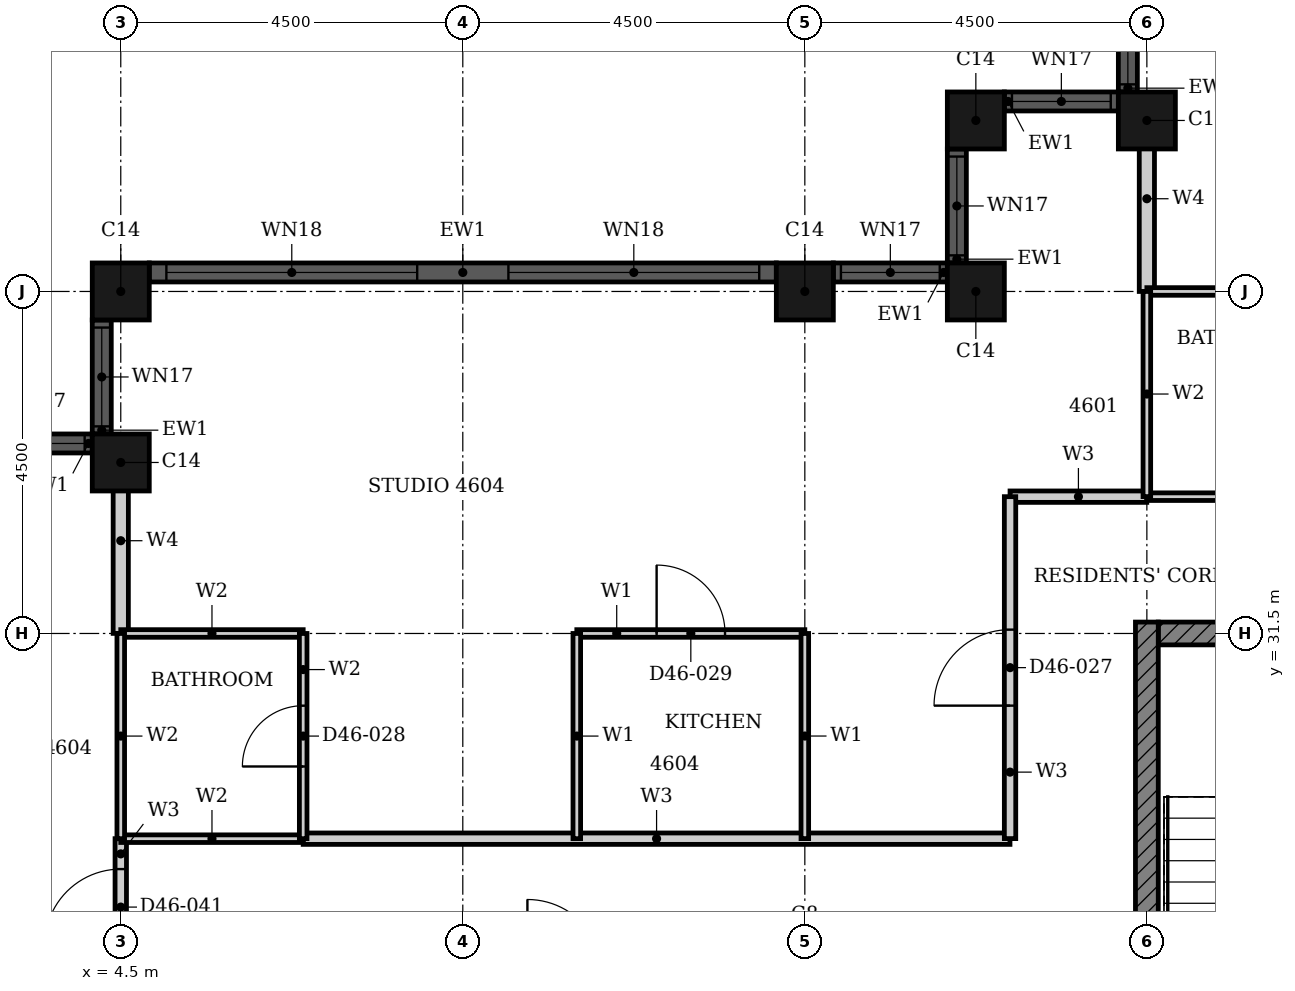
"""IFC4 building model, lengths in metres.
Left out: names, types, materials, properties, quantities, classifications, styles, units other than length and angle.
Written with IfcOpenShell. Run it as: python <this file> out.ifc"""

import sys

from ifc_helpers import new_model, si_unit, direction, frame, frame_2d, origin, origin_2d, place, context, subcontext, project, spatial, rectangle, hollow_rectangle, extrude, element, fill, save


model = new_model("IFC4")
c1 = context("Model", 3, precision=1e-05, world=origin(), true_north=direction((0.0, 1.0)))
c2 = subcontext(c1, "Body", "Model", "MODEL_VIEW")
j1 = project(units=[si_unit("LENGTHUNIT", "METRE"), si_unit("PLANEANGLEUNIT", "RADIAN")], contexts=[c1])
p1 = place(None, origin())
s1 = spatial("IfcSite", under=j1, at=p1, CompositionType="ELEMENT")
p2 = place(p1, origin())
s2 = spatial("IfcBuilding", under=s1, at=p2, CompositionType="ELEMENT")
p3 = place(p2, frame((0.0, 0.0, 183.9)))
s3 = spatial("IfcBuildingStorey", under=s2, at=p3, CompositionType="ELEMENT", Elevation=183.9)
for number, where, z_axis, x_axis in (
    (1, (18.0, 38.25, 0.0), (0.0, 0.0, 1.0), (1.0, 0.0, 0.0)),
    (2, (15.75, 38.25, 0.0), (0.0, 0.0, 1.0), (1.0, 0.0, 0.0)),
    (3, (15.75, 36.0, 0.0), (0.0, 0.0, 1.0), (1.0, 0.0, 0.0)),
    (4, (13.5, 36.0, 0.0), (0.0, 0.0, 1.0), (1.0, 0.0, 0.0)),
    (5, (4.5, 36.0, 0.0), (0.0, 0.0, 1.0), (1.0, 0.0, 0.0)),
    (6, (4.5, 33.75, 0.0), (0.0, 0.0, 1.0), (1.0, 0.0, 0.0)),
):
    element("IfcColumn", number, at=place(p3, frame(where, z_axis=z_axis, x_axis=x_axis)), inside=s3, PredefinedType="COLUMN", context=c2, shape_type="SweptSolid", body=[
        extrude(hollow_rectangle(XDim=0.75, YDim=0.75, WallThickness=0.024, at=origin_2d()), origin(), (0.0, 0.0, 1.0), 3.7),
    ])
p4 = place(p3, frame((17.75, 40.125, 0.0), z_axis=(0.0, 0.0, 1.0), x_axis=(0.0, -1.0, 0.0)))
e7 = element("IfcWall", 7, at=p4, inside=s3, PredefinedType="SOLIDWALL", context=c2, shape_type="SweptSolid", body=[
    extrude(rectangle(XDim=1.5, YDim=0.25, at=frame_2d((0.75, 0.0))), origin(), (0.0, 0.0, 1.0), 3.7),
])
p5 = place(p4, frame((0.1, 0.0, 0.9)))
e8 = element("IfcOpeningElement", 8, at=p5, cuts=e7, PredefinedType="OPENING", context=c2, shape_type="SweptSolid", body=[
    extrude(rectangle(XDim=1.3, YDim=1.95, at=frame_2d((0.65, 0.975))), frame((0.0, 0.135, 0.0), z_axis=(0.0, -1.0, 0.0), x_axis=(1.0, 0.0, 0.0)), (0.0, 0.0, 1.0), 0.27),
])
p6 = place(p3, frame((17.625, 38.5, 0.0), z_axis=(0.0, 0.0, 1.0), x_axis=(-1.0, 0.0, 0.0)))
e9 = element("IfcWall", 9, at=p6, inside=s3, PredefinedType="SOLIDWALL", context=c2, shape_type="SweptSolid", body=[
    extrude(rectangle(XDim=1.5, YDim=0.25, at=frame_2d((0.75, 0.0))), origin(), (0.0, 0.0, 1.0), 3.7),
])
p7 = place(p6, frame((0.1, 0.0, 0.9)))
e10 = element("IfcOpeningElement", 10, at=p7, cuts=e9, PredefinedType="OPENING", context=c2, shape_type="SweptSolid", body=[
    extrude(rectangle(XDim=1.3, YDim=1.95, at=frame_2d((0.65, 0.975))), frame((0.0, 0.135, 0.0), z_axis=(0.0, -1.0, 0.0), x_axis=(1.0, 0.0, 0.0)), (0.0, 0.0, 1.0), 0.27),
])
p8 = place(p3, frame((15.5, 37.875, 0.0), z_axis=(0.0, 0.0, 1.0), x_axis=(0.0, -1.0, 0.0)))
e11 = element("IfcWall", 11, at=p8, inside=s3, PredefinedType="SOLIDWALL", context=c2, shape_type="SweptSolid", body=[
    extrude(rectangle(XDim=1.5, YDim=0.25, at=frame_2d((0.75, 0.0))), origin(), (0.0, 0.0, 1.0), 3.7),
])
p9 = place(p8, frame((0.1, 0.0, 0.9)))
e12 = element("IfcOpeningElement", 12, at=p9, cuts=e11, PredefinedType="OPENING", context=c2, shape_type="SweptSolid", body=[
    extrude(rectangle(XDim=1.3, YDim=1.95, at=frame_2d((0.65, 0.975))), frame((0.0, 0.135, 0.0), z_axis=(0.0, -1.0, 0.0), x_axis=(1.0, 0.0, 0.0)), (0.0, 0.0, 1.0), 0.27),
])
p10 = place(p3, frame((15.375, 36.25, 0.0), z_axis=(0.0, 0.0, 1.0), x_axis=(-1.0, 0.0, 0.0)))
e13 = element("IfcWall", 13, at=p10, inside=s3, PredefinedType="SOLIDWALL", context=c2, shape_type="SweptSolid", body=[
    extrude(rectangle(XDim=1.5, YDim=0.25, at=frame_2d((0.75, 0.0))), origin(), (0.0, 0.0, 1.0), 3.7),
])
p11 = place(p10, frame((0.1, 0.0, 0.9)))
e14 = element("IfcOpeningElement", 14, at=p11, cuts=e13, PredefinedType="OPENING", context=c2, shape_type="SweptSolid", body=[
    extrude(rectangle(XDim=1.3, YDim=1.95, at=frame_2d((0.65, 0.975))), frame((0.0, 0.135, 0.0), z_axis=(0.0, -1.0, 0.0), x_axis=(1.0, 0.0, 0.0)), (0.0, 0.0, 1.0), 0.27),
])
p12 = place(p3, frame((13.125, 36.25, 0.0), z_axis=(0.0, 0.0, 1.0), x_axis=(-1.0, 0.0, 0.0)))
e15 = element("IfcWall", 15, at=p12, inside=s3, PredefinedType="SOLIDWALL", context=c2, shape_type="SweptSolid", body=[
    extrude(rectangle(XDim=8.25, YDim=0.25, at=frame_2d((4.125, 0.0))), origin(), (0.0, 0.0, 1.0), 3.7),
])
p13 = place(p12, frame((0.225, 0.0, 0.45)))
e16 = element("IfcOpeningElement", 16, at=p13, cuts=e15, PredefinedType="OPENING", context=c2, shape_type="SweptSolid", body=[
    extrude(rectangle(XDim=3.3, YDim=2.4, at=frame_2d((1.65, 1.2))), frame((0.0, 0.135, 0.0), z_axis=(0.0, -1.0, 0.0), x_axis=(1.0, 0.0, 0.0)), (0.0, 0.0, 1.0), 0.27),
])
p14 = place(p12, frame((4.725, 0.0, 0.45)))
e17 = element("IfcOpeningElement", 17, at=p14, cuts=e15, PredefinedType="OPENING", context=c2, shape_type="SweptSolid", body=[
    extrude(rectangle(XDim=3.3, YDim=2.4, at=frame_2d((1.65, 1.2))), frame((0.0, 0.135, 0.0), z_axis=(0.0, -1.0, 0.0), x_axis=(1.0, 0.0, 0.0)), (0.0, 0.0, 1.0), 0.27),
])
p15 = place(p3, frame((4.25, 35.625, 0.0), z_axis=(0.0, 0.0, 1.0), x_axis=(0.0, -1.0, 0.0)))
e18 = element("IfcWall", 18, at=p15, inside=s3, PredefinedType="SOLIDWALL", context=c2, shape_type="SweptSolid", body=[
    extrude(rectangle(XDim=1.5, YDim=0.25, at=frame_2d((0.75, 0.0))), origin(), (0.0, 0.0, 1.0), 3.7),
])
p16 = place(p15, frame((0.1, 0.0, 0.9)))
e19 = element("IfcOpeningElement", 19, at=p16, cuts=e18, PredefinedType="OPENING", context=c2, shape_type="SweptSolid", body=[
    extrude(rectangle(XDim=1.3, YDim=1.95, at=frame_2d((0.65, 0.975))), frame((0.0, 0.135, 0.0), z_axis=(0.0, -1.0, 0.0), x_axis=(1.0, 0.0, 0.0)), (0.0, 0.0, 1.0), 0.27),
])
p17 = place(p3, frame((4.125, 34.0, 0.0), z_axis=(0.0, 0.0, 1.0), x_axis=(-1.0, 0.0, 0.0)))
e20 = element("IfcWall", 20, at=p17, inside=s3, PredefinedType="SOLIDWALL", context=c2, shape_type="SweptSolid", body=[
    extrude(rectangle(XDim=1.5, YDim=0.25, at=frame_2d((0.75, 0.0))), origin(), (0.0, 0.0, 1.0), 3.7),
])
p18 = place(p17, frame((0.1, 0.0, 0.9)))
e21 = element("IfcOpeningElement", 21, at=p18, cuts=e20, PredefinedType="OPENING", context=c2, shape_type="SweptSolid", body=[
    extrude(rectangle(XDim=1.3, YDim=1.95, at=frame_2d((0.65, 0.975))), frame((0.0, 0.135, 0.0), z_axis=(0.0, -1.0, 0.0), x_axis=(1.0, 0.0, 0.0)), (0.0, 0.0, 1.0), 0.27),
])
p19 = place(p3, frame((18.15, 31.5, 0.0), z_axis=(0.0, 0.0, 1.0), x_axis=(1.0, 0.0, 0.0)))
e22 = element("IfcWall", 22, at=p19, inside=s3, PredefinedType="SHEAR", context=c2, shape_type="SweptSolid", body=[
    extrude(rectangle(XDim=9.368, YDim=0.3, at=frame_2d((4.684, 0.0))), origin(), (0.0, 0.0, 1.0), 3.3),
])
p20 = place(p19, frame((4.736, 0.0, 0.0)))
e23 = element("IfcOpeningElement", 23, at=p20, cuts=e22, PredefinedType="OPENING", context=c2, shape_type="SweptSolid", body=[
    extrude(rectangle(XDim=1.8, YDim=2.1, at=frame_2d((0.9, 1.05))), frame((0.0, 0.16, 0.0), z_axis=(0.0, -1.0, 0.0), x_axis=(1.0, 0.0, 0.0)), (0.0, 0.0, 1.0), 0.32),
])
p21 = place(p3, frame((18.0, 22.35, 0.0), z_axis=(0.0, 0.0, 1.0), x_axis=(0.0, 1.0, 0.0)))
e24 = element("IfcWall", 24, at=p21, inside=s3, PredefinedType="SHEAR", context=c2, shape_type="SweptSolid", body=[
    extrude(rectangle(XDim=9.3, YDim=0.3, at=frame_2d((4.65, 0.0))), origin(), (0.0, 0.0, 1.0), 3.3),
])
p22 = place(p3, frame((6.9, 28.8, 0.0), z_axis=(0.0, 0.0, 1.0), x_axis=(1.0, 0.0, 0.0)))
e25 = element("IfcWall", 25, at=p22, inside=s3, PredefinedType="PARTITIONING", context=c2, shape_type="SweptSolid", body=[
    extrude(rectangle(XDim=9.299, YDim=0.15, at=frame_2d((4.649, 0.0))), origin(), (0.0, 0.0, 1.0), 3.3),
])
p23 = place(p3, frame((16.2, 33.3, 0.0), z_axis=(0.0, 0.0, 1.0), x_axis=(1.0, 0.0, 0.0)))
e26 = element("IfcWall", 26, at=p23, inside=s3, PredefinedType="PARTITIONING", context=c2, shape_type="SweptSolid", body=[
    extrude(rectangle(XDim=1.799, YDim=0.15, at=frame_2d((0.899, 0.0))), origin(), (0.0, 0.0, 1.0), 3.3),
])
p24 = place(p3, frame((16.2, 28.801, 0.0), z_axis=(0.0, 0.0, 1.0), x_axis=(0.0, 1.0, 0.0)))
e27 = element("IfcWall", 27, at=p24, inside=s3, PredefinedType="PARTITIONING", context=c2, shape_type="SweptSolid", body=[
    extrude(rectangle(XDim=4.499, YDim=0.15, at=frame_2d((2.25, 0.0))), origin(), (0.0, 0.0, 1.0), 3.3),
])
p25 = place(p24, frame((1.75, 0.0, 0.0)))
e28 = element("IfcOpeningElement", 28, at=p25, cuts=e27, PredefinedType="OPENING", context=c2, shape_type="SweptSolid", body=[
    extrude(rectangle(XDim=1.0, YDim=2.2, at=frame_2d((0.5, 1.1))), frame((0.0, 0.085, 0.0), z_axis=(0.0, -1.0, 0.0), x_axis=(1.0, 0.0, 0.0)), (0.0, 0.0, 1.0), 0.17),
])
p26 = place(p3, frame((4.5, 27.0, 0.0), z_axis=(0.0, 0.0, 1.0), x_axis=(0.0, 1.0, 0.0)))
e29 = element("IfcWall", 29, at=p26, inside=s3, PredefinedType="PARTITIONING", context=c2, shape_type="SweptSolid", body=[
    extrude(rectangle(XDim=1.8, YDim=0.15, at=frame_2d((0.9, 0.0))), origin(), (0.0, 0.0, 1.0), 3.3),
])
p27 = place(p26, frame((0.4, 0.0, 0.0)))
e30 = element("IfcOpeningElement", 30, at=p27, cuts=e29, PredefinedType="OPENING", context=c2, shape_type="SweptSolid", body=[
    extrude(rectangle(XDim=1.0, YDim=2.2, at=frame_2d((0.5, 1.1))), frame((0.0, 0.085, 0.0), z_axis=(0.0, -1.0, 0.0), x_axis=(1.0, 0.0, 0.0)), (0.0, 0.0, 1.0), 0.17),
])
p28 = place(p3, frame((10.5, 31.5, 0.0), z_axis=(0.0, 0.0, 1.0), x_axis=(1.0, 0.0, 0.0)))
e31 = element("IfcWall", 31, at=p28, inside=s3, PredefinedType="PARTITIONING", context=c2, shape_type="SweptSolid", body=[
    extrude(rectangle(XDim=3.0, YDim=0.1, at=frame_2d((1.5, 0.0))), origin(), (0.0, 0.0, 1.0), 2.58),
])
p29 = place(p28, frame((1.05, 0.0, 0.0)))
e32 = element("IfcOpeningElement", 32, at=p29, cuts=e31, PredefinedType="OPENING", context=c2, shape_type="SweptSolid", body=[
    extrude(rectangle(XDim=0.9, YDim=2.1, at=frame_2d((0.45, 1.05))), frame((0.0, 0.06, 0.0), z_axis=(0.0, -1.0, 0.0), x_axis=(1.0, 0.0, 0.0)), (0.0, 0.0, 1.0), 0.12),
])
p30 = place(p3, frame((10.5, 28.8, 0.0), z_axis=(0.0, 0.0, 1.0), x_axis=(0.0, 1.0, 0.0)))
e33 = element("IfcWall", 33, at=p30, inside=s3, PredefinedType="PARTITIONING", context=c2, shape_type="SweptSolid", body=[
    extrude(rectangle(XDim=2.7, YDim=0.1, at=frame_2d((1.35, 0.0))), origin(), (0.0, 0.0, 1.0), 3.3),
])
p31 = place(p3, frame((13.5, 28.801, 0.0), z_axis=(0.0, 0.0, 1.0), x_axis=(0.0, 1.0, 0.0)))
e34 = element("IfcWall", 34, at=p31, inside=s3, PredefinedType="PARTITIONING", context=c2, shape_type="SweptSolid", body=[
    extrude(rectangle(XDim=2.699, YDim=0.1, at=frame_2d((1.35, 0.0))), origin(), (0.0, 0.0, 1.0), 2.38),
])
p32 = place(p3, frame((18.0, 36.0, 0.0), z_axis=(0.0, 0.0, 1.0), x_axis=(0.0, 1.0, 0.0)))
e35 = element("IfcWall", 35, at=p32, inside=s3, PredefinedType="PARTITIONING", context=c2, shape_type="SweptSolid", body=[
    extrude(rectangle(XDim=2.44, YDim=0.2, at=frame_2d((1.22, 0.0))), origin(), (0.0, 0.0, 1.0), 3.3),
])
p33 = place(p3, frame((4.5, 31.501, 0.0), z_axis=(0.0, 0.0, 1.0), x_axis=(0.0, 1.0, 0.0)))
e36 = element("IfcWall", 36, at=p33, inside=s3, PredefinedType="PARTITIONING", context=c2, shape_type="SweptSolid", body=[
    extrude(rectangle(XDim=2.439, YDim=0.2, at=frame_2d((1.219, 0.0))), origin(), (0.0, 0.0, 1.0), 3.3),
])
p34 = place(p3, frame((4.5, 28.8, 0.0), z_axis=(0.0, 0.0, 1.0), x_axis=(1.0, 0.0, 0.0)))
e37 = element("IfcWall", 37, at=p34, inside=s3, PredefinedType="PARTITIONING", context=c2, shape_type="SweptSolid", body=[
    extrude(rectangle(XDim=2.4, YDim=0.1, at=frame_2d((1.2, 0.0))), origin(), (0.0, 0.0, 1.0), 3.3),
])
p35 = place(p3, frame((4.5, 31.5, 0.0), z_axis=(0.0, 0.0, 1.0), x_axis=(1.0, 0.0, 0.0)))
e38 = element("IfcWall", 38, at=p35, inside=s3, PredefinedType="PARTITIONING", context=c2, shape_type="SweptSolid", body=[
    extrude(rectangle(XDim=2.4, YDim=0.1, at=frame_2d((1.2, 0.0))), origin(), (0.0, 0.0, 1.0), 2.58),
])
for number, where, z_axis, x_axis in (
    (39, (18.0, 33.3, 0.0), (0.0, 0.0, 1.0), (1.0, 0.0, 0.0)),
    (40, (18.0, 36.0, 0.0), (0.0, 0.0, 1.0), (1.0, 0.0, 0.0)),
):
    element("IfcWall", number, at=place(p3, frame(where, z_axis=z_axis, x_axis=x_axis)), inside=s3, PredefinedType="PARTITIONING", context=c2, shape_type="SweptSolid", body=[
        extrude(rectangle(XDim=2.4, YDim=0.1, at=frame_2d((1.2, 0.0))), origin(), (0.0, 0.0, 1.0), 3.3),
    ])
p36 = place(p3, frame((18.0, 33.301, 0.0), z_axis=(0.0, 0.0, 1.0), x_axis=(0.0, 1.0, 0.0)))
e41 = element("IfcWall", 41, at=p36, inside=s3, PredefinedType="PARTITIONING", context=c2, shape_type="SweptSolid", body=[
    extrude(rectangle(XDim=2.699, YDim=0.1, at=frame_2d((1.35, 0.0))), origin(), (0.0, 0.0, 1.0), 3.3),
])
p37 = place(p3, frame((4.5, 28.8, 0.0), z_axis=(0.0, 0.0, 1.0), x_axis=(0.0, 1.0, 0.0)))
e42 = element("IfcWall", 42, at=p37, inside=s3, PredefinedType="PARTITIONING", context=c2, shape_type="SweptSolid", body=[
    extrude(rectangle(XDim=2.7, YDim=0.1, at=frame_2d((1.35, 0.0))), origin(), (0.0, 0.0, 1.0), 3.3),
])
p38 = place(p3, frame((6.9, 28.8, 0.0), z_axis=(0.0, 0.0, 1.0), x_axis=(0.0, 1.0, 0.0)))
e43 = element("IfcWall", 43, at=p38, inside=s3, PredefinedType="PARTITIONING", context=c2, shape_type="SweptSolid", body=[
    extrude(rectangle(XDim=2.7, YDim=0.1, at=frame_2d((1.35, 0.0))), origin(), (0.0, 0.0, 1.0), 3.3),
])
p39 = place(p38, frame((0.95, 0.0, 0.0)))
e44 = element("IfcOpeningElement", 44, at=p39, cuts=e43, PredefinedType="OPENING", context=c2, shape_type="SweptSolid", body=[
    extrude(rectangle(XDim=0.8, YDim=2.1, at=frame_2d((0.4, 1.05))), frame((0.0, 0.06, 0.0), z_axis=(0.0, -1.0, 0.0), x_axis=(1.0, 0.0, 0.0)), (0.0, 0.0, 1.0), 0.12),
])
p40 = place(p5, origin())
e45 = element("IfcWindow", 45, at=p40, inside=s3, PartitioningType="SINGLE_PANEL", PredefinedType="WINDOW", context=c2, shape_type="SweptSolid", body=[
    extrude(rectangle(XDim=1.3, YDim=1.95, at=frame_2d((0.65, 0.975))), frame((0.0, 0.03, 0.0), z_axis=(0.0, -1.0, 0.0), x_axis=(1.0, 0.0, 0.0)), (0.0, 0.0, 1.0), 0.06),
])
fill(e8, e45)
p41 = place(p7, origin())
e46 = element("IfcWindow", 46, at=p41, inside=s3, PartitioningType="SINGLE_PANEL", PredefinedType="WINDOW", context=c2, shape_type="SweptSolid", body=[
    extrude(rectangle(XDim=1.3, YDim=1.95, at=frame_2d((0.65, 0.975))), frame((0.0, 0.03, 0.0), z_axis=(0.0, -1.0, 0.0), x_axis=(1.0, 0.0, 0.0)), (0.0, 0.0, 1.0), 0.06),
])
fill(e10, e46)
p42 = place(p9, origin())
e47 = element("IfcWindow", 47, at=p42, inside=s3, PartitioningType="SINGLE_PANEL", PredefinedType="WINDOW", context=c2, shape_type="SweptSolid", body=[
    extrude(rectangle(XDim=1.3, YDim=1.95, at=frame_2d((0.65, 0.975))), frame((0.0, 0.03, 0.0), z_axis=(0.0, -1.0, 0.0), x_axis=(1.0, 0.0, 0.0)), (0.0, 0.0, 1.0), 0.06),
])
fill(e12, e47)
p43 = place(p11, origin())
e48 = element("IfcWindow", 48, at=p43, inside=s3, PartitioningType="SINGLE_PANEL", PredefinedType="WINDOW", context=c2, shape_type="SweptSolid", body=[
    extrude(rectangle(XDim=1.3, YDim=1.95, at=frame_2d((0.65, 0.975))), frame((0.0, 0.03, 0.0), z_axis=(0.0, -1.0, 0.0), x_axis=(1.0, 0.0, 0.0)), (0.0, 0.0, 1.0), 0.06),
])
fill(e14, e48)
p44 = place(p13, origin())
e49 = element("IfcWindow", 49, at=p44, inside=s3, PartitioningType="SINGLE_PANEL", PredefinedType="WINDOW", context=c2, shape_type="SweptSolid", body=[
    extrude(rectangle(XDim=3.3, YDim=2.4, at=frame_2d((1.65, 1.2))), frame((0.0, 0.03, 0.0), z_axis=(0.0, -1.0, 0.0), x_axis=(1.0, 0.0, 0.0)), (0.0, 0.0, 1.0), 0.06),
])
fill(e16, e49)
p45 = place(p14, origin())
e50 = element("IfcWindow", 50, at=p45, inside=s3, PartitioningType="SINGLE_PANEL", PredefinedType="WINDOW", context=c2, shape_type="SweptSolid", body=[
    extrude(rectangle(XDim=3.3, YDim=2.4, at=frame_2d((1.65, 1.2))), frame((0.0, 0.03, 0.0), z_axis=(0.0, -1.0, 0.0), x_axis=(1.0, 0.0, 0.0)), (0.0, 0.0, 1.0), 0.06),
])
fill(e17, e50)
p46 = place(p16, origin())
e51 = element("IfcWindow", 51, at=p46, inside=s3, PartitioningType="SINGLE_PANEL", PredefinedType="WINDOW", context=c2, shape_type="SweptSolid", body=[
    extrude(rectangle(XDim=1.3, YDim=1.95, at=frame_2d((0.65, 0.975))), frame((0.0, 0.03, 0.0), z_axis=(0.0, -1.0, 0.0), x_axis=(1.0, 0.0, 0.0)), (0.0, 0.0, 1.0), 0.06),
])
fill(e19, e51)
p47 = place(p18, origin())
e52 = element("IfcWindow", 52, at=p47, inside=s3, PartitioningType="SINGLE_PANEL", PredefinedType="WINDOW", context=c2, shape_type="SweptSolid", body=[
    extrude(rectangle(XDim=1.3, YDim=1.95, at=frame_2d((0.65, 0.975))), frame((0.0, 0.03, 0.0), z_axis=(0.0, -1.0, 0.0), x_axis=(1.0, 0.0, 0.0)), (0.0, 0.0, 1.0), 0.06),
])
fill(e21, e52)
p48 = place(p25, origin())
e53 = element("IfcDoor", 53, at=p48, inside=s3, OperationType="SINGLE_SWING_LEFT", PredefinedType="DOOR", context=c2, shape_type="SweptSolid", body=[
    extrude(rectangle(XDim=1.0, YDim=2.2, at=frame_2d((0.5, 1.1))), frame((0.0, 0.025, 0.0), z_axis=(0.0, -1.0, 0.0), x_axis=(1.0, 0.0, 0.0)), (0.0, 0.0, 1.0), 0.05),
])
fill(e28, e53)
p49 = place(p39, origin())
e54 = element("IfcDoor", 54, at=p49, inside=s3, OperationType="SINGLE_SWING_LEFT", PredefinedType="DOOR", context=c2, shape_type="SweptSolid", body=[
    extrude(rectangle(XDim=0.8, YDim=2.1, at=frame_2d((0.4, 1.05))), frame((0.0, 0.025, 0.0), z_axis=(0.0, -1.0, 0.0), x_axis=(1.0, 0.0, 0.0)), (0.0, 0.0, 1.0), 0.05),
])
fill(e44, e54)
p50 = place(p29, origin())
e55 = element("IfcDoor", 55, at=p50, inside=s3, OperationType="SINGLE_SWING_RIGHT", PredefinedType="DOOR", context=c2, shape_type="SweptSolid", body=[
    extrude(rectangle(XDim=0.9, YDim=2.1, at=frame_2d((0.45, 1.05))), frame((0.0, 0.025, 0.0), z_axis=(0.0, -1.0, 0.0), x_axis=(1.0, 0.0, 0.0)), (0.0, 0.0, 1.0), 0.05),
])
fill(e32, e55)
p51 = place(p27, origin())
e56 = element("IfcDoor", 56, at=p51, inside=s3, OperationType="SINGLE_SWING_RIGHT", PredefinedType="DOOR", context=c2, shape_type="SweptSolid", body=[
    extrude(rectangle(XDim=1.0, YDim=2.2, at=frame_2d((0.5, 1.1))), frame((0.0, 0.025, 0.0), z_axis=(0.0, -1.0, 0.0), x_axis=(1.0, 0.0, 0.0)), (0.0, 0.0, 1.0), 0.05),
])
fill(e30, e56)
save(model, sys.argv[1])
